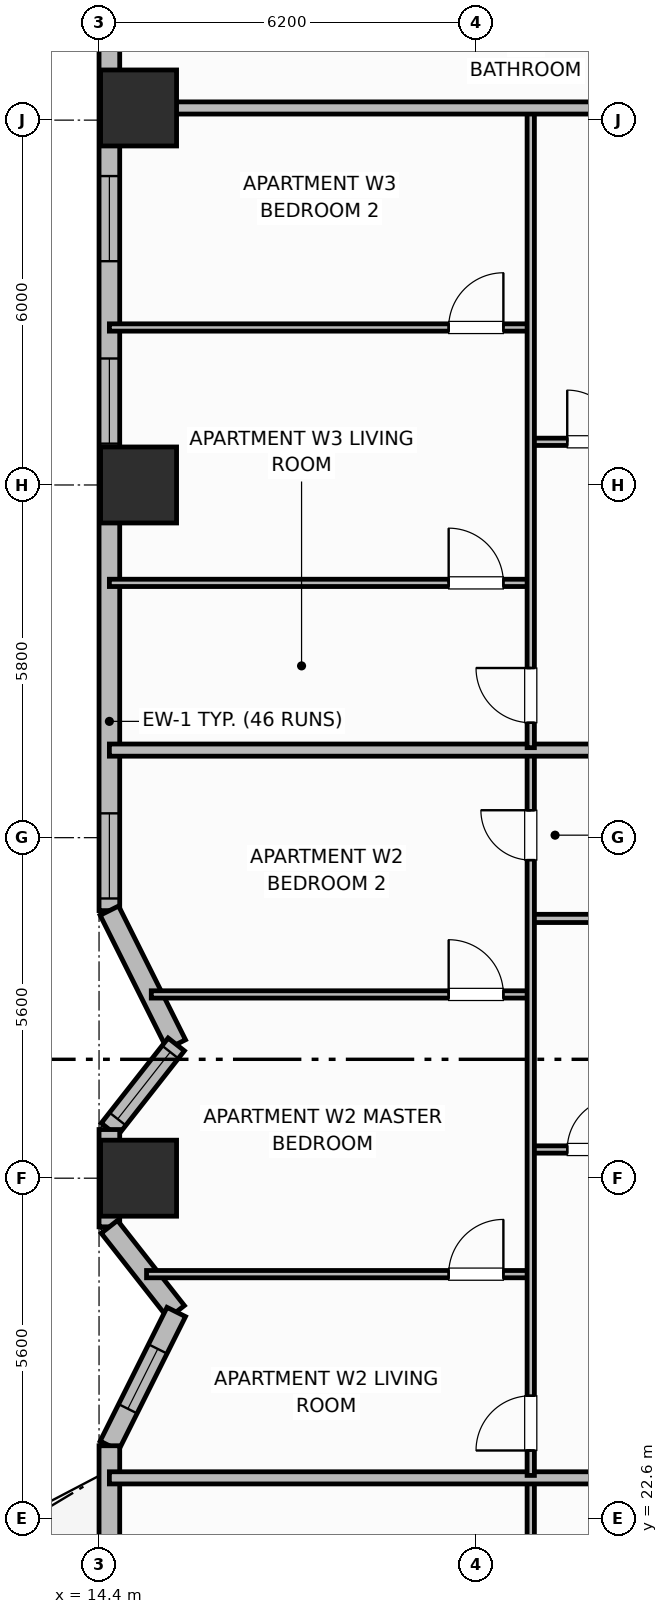
"""IFC4 building model, lengths in metres.
Left out: names, types, materials, properties, quantities, classifications, styles, units other than length and angle.
Written with IfcOpenShell. Run it as: python <this file> out.ifc"""

import sys

from ifc_helpers import new_model, si_unit, direction, frame, frame_2d, origin, origin_2d, place, context, subcontext, project, spatial, rectangle, extrude, element, fill, save


model = new_model("IFC4")
c1 = context("Model", 3, precision=1e-05, world=origin(), true_north=direction((0.0, 1.0)))
c2 = subcontext(c1, "Body", "Model", "MODEL_VIEW")
j1 = project(units=[si_unit("LENGTHUNIT", "METRE"), si_unit("PLANEANGLEUNIT", "RADIAN")], contexts=[c1])
p1 = place(None, origin())
s1 = spatial("IfcSite", under=j1, at=p1, CompositionType="ELEMENT")
p2 = place(p1, origin())
s2 = spatial("IfcBuilding", under=s1, at=p2, CompositionType="ELEMENT")
p3 = place(p2, frame((0.0, 0.0, 69.5)))
s3 = spatial("IfcBuildingStorey", under=s2, at=p3, CompositionType="ELEMENT", Elevation=69.5)
for number, where, z_axis, x_axis in (
    (1, (15.05, 28.2, 0.0), (0.0, 0.0, 1.0), (1.0, 0.0, 0.0)),
    (2, (15.05, 39.6, 0.0), (0.0, 0.0, 1.0), (1.0, 0.0, 0.0)),
    (3, (15.05, 45.8, 0.0), (0.0, 0.0, 1.0), (1.0, 0.0, 0.0)),
):
    element("IfcColumn", number, at=place(p3, frame(where, z_axis=z_axis, x_axis=x_axis)), inside=s3, PredefinedType="COLUMN", context=c2, shape_type="SweptSolid", body=[
        extrude(rectangle(XDim=1.25, YDim=1.25, at=origin_2d()), origin(), (0.0, 0.0, 1.0), 3.7),
    ])
p4 = place(p3, frame((14.57, 47.4, 0.0), z_axis=(0.0, 0.0, 1.0), x_axis=(0.0, -1.0, 0.0)))
e4 = element("IfcWall", 4, at=p4, inside=s3, PredefinedType="SOLIDWALL", context=c2, shape_type="SweptSolid", body=[
    extrude(rectangle(XDim=14.8, YDim=0.34, at=frame_2d((7.4, 0.0))), origin(), (0.0, 0.0, 1.0), 2.7),
])
p5 = place(p4, frame((2.72, 0.0, 0.69)))
e5 = element("IfcOpeningElement", 5, at=p5, cuts=e4, PredefinedType="OPENING", context=c2, shape_type="SweptSolid", body=[
    extrude(rectangle(XDim=1.4, YDim=1.85, at=frame_2d((0.7, 0.925))), frame((0.0, 0.18, 0.0), z_axis=(0.0, -1.0, 0.0), x_axis=(1.0, 0.0, 0.0)), (0.0, 0.0, 1.0), 0.36),
])
p6 = place(p4, frame((5.72, 0.0, 0.69)))
e6 = element("IfcOpeningElement", 6, at=p6, cuts=e4, PredefinedType="OPENING", context=c2, shape_type="SweptSolid", body=[
    extrude(rectangle(XDim=1.4, YDim=1.85, at=frame_2d((0.7, 0.925))), frame((0.0, 0.18, 0.0), z_axis=(0.0, -1.0, 0.0), x_axis=(1.0, 0.0, 0.0)), (0.0, 0.0, 1.0), 0.36),
])
p7 = place(p4, frame((13.2, 0.0, 0.69)))
e7 = element("IfcOpeningElement", 7, at=p7, cuts=e4, PredefinedType="OPENING", context=c2, shape_type="SweptSolid", body=[
    extrude(rectangle(XDim=1.4, YDim=1.85, at=frame_2d((0.7, 0.925))), frame((0.0, 0.18, 0.0), z_axis=(0.0, -1.0, 0.0), x_axis=(1.0, 0.0, 0.0)), (0.0, 0.0, 1.0), 0.36),
])
p8 = place(p3, frame((14.57, 32.6, 0.0), z_axis=(0.0, 0.0, 1.0), x_axis=(0.44713419144, -0.894466888625, 0.0)))
e8 = element("IfcWall", 8, at=p8, inside=s3, PredefinedType="SOLIDWALL", context=c2, shape_type="SweptSolid", body=[
    extrude(rectangle(XDim=2.46, YDim=0.34, at=frame_2d((1.23, 0.0))), origin(), (0.0, 0.0, 1.0), 2.7),
])
p9 = place(p3, frame((15.67, 30.4, 0.0), z_axis=(0.0, 0.0, 1.0), x_axis=(-0.617797325735, -0.786337373088, 0.0)))
e9 = element("IfcWall", 9, at=p9, inside=s3, PredefinedType="SOLIDWALL", context=c2, shape_type="SweptSolid", body=[
    extrude(rectangle(XDim=1.78, YDim=0.34, at=frame_2d((0.89, 0.0))), origin(), (0.0, 0.0, 1.0), 2.7),
])
p10 = place(p9, frame((0.16, 0.0, 0.69)))
e10 = element("IfcOpeningElement", 10, at=p10, cuts=e9, PredefinedType="OPENING", context=c2, shape_type="SweptSolid", body=[
    extrude(rectangle(XDim=1.4, YDim=1.85, at=frame_2d((0.7, 0.925))), frame((0.0, 0.18, 0.0), z_axis=(0.0, -1.0, 0.0), x_axis=(1.0, 0.0, 0.0)), (0.0, 0.0, 1.0), 0.36),
])
p11 = place(p3, frame((14.57, 29.0, 0.0), z_axis=(0.0, 0.0, 1.0), x_axis=(0.0, -1.0, 0.0)))
e11 = element("IfcWall", 11, at=p11, inside=s3, PredefinedType="SOLIDWALL", context=c2, shape_type="SweptSolid", body=[
    extrude(rectangle(XDim=1.6, YDim=0.34, at=frame_2d((0.8, 0.0))), origin(), (0.0, 0.0, 1.0), 2.7),
])
p12 = place(p3, frame((14.57, 27.4, 0.0), z_axis=(0.0, 0.0, 1.0), x_axis=(0.617797325735, -0.786337373088, 0.0)))
e12 = element("IfcWall", 12, at=p12, inside=s3, PredefinedType="SOLIDWALL", context=c2, shape_type="SweptSolid", body=[
    extrude(rectangle(XDim=1.78, YDim=0.34, at=frame_2d((0.89, 0.0))), origin(), (0.0, 0.0, 1.0), 2.7),
])
p13 = place(p3, frame((15.67, 26.0, 0.0), z_axis=(0.0, 0.0, 1.0), x_axis=(-0.447173890385, -0.894447042456, 0.0)))
e13 = element("IfcWall", 13, at=p13, inside=s3, PredefinedType="SOLIDWALL", context=c2, shape_type="SweptSolid", body=[
    extrude(rectangle(XDim=2.459, YDim=0.34, at=frame_2d((1.23, 0.0))), origin(), (0.0, 0.0, 1.0), 2.7),
])
p14 = place(p13, frame((0.68, 0.0, 0.89)))
e14 = element("IfcOpeningElement", 14, at=p14, cuts=e13, PredefinedType="OPENING", context=c2, shape_type="SweptSolid", body=[
    extrude(rectangle(XDim=1.1, YDim=1.65, at=frame_2d((0.55, 0.825))), frame((0.0, 0.18, 0.0), z_axis=(0.0, -1.0, 0.0), x_axis=(1.0, 0.0, 0.0)), (0.0, 0.0, 1.0), 0.36),
])
p15 = place(p3, frame((14.57, 23.8, 0.0), z_axis=(0.0, 0.0, 1.0), x_axis=(0.0, -1.0, 0.0)))
e15 = element("IfcWall", 15, at=p15, inside=s3, PredefinedType="SOLIDWALL", context=c2, shape_type="SweptSolid", body=[
    extrude(rectangle(XDim=14.8, YDim=0.34, at=frame_2d((7.4, 0.0))), origin(), (0.0, 0.0, 1.0), 2.7),
])
p16 = place(p15, frame((2.1, 0.0, 0.0)))
e16 = element("IfcOpeningElement", 16, at=p16, cuts=e15, PredefinedType="OPENING", context=c2, shape_type="SweptSolid", body=[
    extrude(rectangle(XDim=1.6, YDim=2.1, at=frame_2d((0.8, 1.05))), frame((0.0, 0.18, 0.0), z_axis=(0.0, -1.0, 0.0), x_axis=(1.0, 0.0, 0.0)), (0.0, 0.0, 1.0), 0.36),
])
p17 = place(p15, frame((5.2, 0.0, 0.89)))
e17 = element("IfcOpeningElement", 17, at=p17, cuts=e15, PredefinedType="OPENING", context=c2, shape_type="SweptSolid", body=[
    extrude(rectangle(XDim=1.1, YDim=1.65, at=frame_2d((0.55, 0.825))), frame((0.0, 0.18, 0.0), z_axis=(0.0, -1.0, 0.0), x_axis=(1.0, 0.0, 0.0)), (0.0, 0.0, 1.0), 0.36),
])
p18 = place(p15, frame((9.438, 0.0, 0.73)))
e18 = element("IfcOpeningElement", 18, at=p18, cuts=e15, PredefinedType="OPENING", context=c2, shape_type="SweptSolid", body=[
    extrude(rectangle(XDim=1.4, YDim=1.85, at=frame_2d((0.7, 0.925))), frame((0.0, 0.18, 0.0), z_axis=(0.0, -1.0, 0.0), x_axis=(1.0, 0.0, 0.0)), (0.0, 0.0, 1.0), 0.36),
])
p19 = place(p3, frame((21.5, 10.64, 0.0), z_axis=(0.0, 0.0, 1.0), x_axis=(0.0, 1.0, 0.0)))
e19 = element("IfcWall", 19, at=p19, inside=s3, PredefinedType="PARTITIONING", context=c2, shape_type="SweptSolid", body=[
    extrude(rectangle(XDim=12.592, YDim=0.12, at=frame_2d((6.296, 0.0))), origin(), (0.0, 0.0, 1.0), 2.53),
])
p20 = place(p19, frame((0.41, 0.0, 0.0)))
e20 = element("IfcOpeningElement", 20, at=p20, cuts=e19, PredefinedType="OPENING", context=c2, shape_type="SweptSolid", body=[
    extrude(rectangle(XDim=0.9, YDim=2.1, at=frame_2d((0.45, 1.05))), frame((0.0, 0.07, 0.0), z_axis=(0.0, -1.0, 0.0), x_axis=(1.0, 0.0, 0.0)), (0.0, 0.0, 1.0), 0.14),
])
p21 = place(p19, frame((10.471, 0.0, 0.0)))
e21 = element("IfcOpeningElement", 21, at=p21, cuts=e19, PredefinedType="OPENING", context=c2, shape_type="SweptSolid", body=[
    extrude(rectangle(XDim=0.82, YDim=2.08, at=frame_2d((0.41, 1.04))), frame((0.0, 0.07, 0.0), z_axis=(0.0, -1.0, 0.0), x_axis=(1.0, 0.0, 0.0)), (0.0, 0.0, 1.0), 0.14),
])
p22 = place(p3, frame((14.57, 23.272, 0.0), z_axis=(0.0, 0.0, 1.0), x_axis=(1.0, 0.0, 0.0)))
e22 = element("IfcWall", 22, at=p22, inside=s3, PredefinedType="PARTITIONING", context=c2, shape_type="SweptSolid", body=[
    extrude(rectangle(XDim=9.18, YDim=0.2, at=frame_2d((4.59, 0.0))), origin(), (0.0, 0.0, 1.0), 2.53),
])
p23 = place(p3, frame((21.5, 28.672, 0.0), z_axis=(0.0, 0.0, 1.0), x_axis=(1.0, 0.0, 0.0)))
e23 = element("IfcWall", 23, at=p23, inside=s3, PredefinedType="PARTITIONING", context=c2, shape_type="SweptSolid", body=[
    extrude(rectangle(XDim=2.25, YDim=0.12, at=frame_2d((1.125, 0.0))), origin(), (0.0, 0.0, 1.0), 2.53),
])
p24 = place(p23, frame((0.6, 0.0, 0.0)))
e24 = element("IfcOpeningElement", 24, at=p24, cuts=e23, PredefinedType="OPENING", context=c2, shape_type="SweptSolid", body=[
    extrude(rectangle(XDim=0.85, YDim=2.1, at=frame_2d((0.425, 1.05))), frame((0.0, 0.07, 0.0), z_axis=(0.0, -1.0, 0.0), x_axis=(1.0, 0.0, 0.0)), (0.0, 0.0, 1.0), 0.14),
])
p25 = place(p3, frame((21.5, 32.472, 0.0), z_axis=(0.0, 0.0, 1.0), x_axis=(1.0, 0.0, 0.0)))
e25 = element("IfcWall", 25, at=p25, inside=s3, PredefinedType="PARTITIONING", context=c2, shape_type="SweptSolid", body=[
    extrude(rectangle(XDim=2.25, YDim=0.135, at=frame_2d((1.125, 0.0))), origin(), (0.0, 0.0, 1.0), 2.53),
])
p26 = place(p3, frame((15.181, 26.622, 0.0), z_axis=(0.0, 0.0, 1.0), x_axis=(1.0, 0.0, 0.0)))
e26 = element("IfcWall", 26, at=p26, inside=s3, PredefinedType="PARTITIONING", context=c2, shape_type="SweptSolid", body=[
    extrude(rectangle(XDim=6.319, YDim=0.12, at=frame_2d((3.159, 0.0))), origin(), (0.0, 0.0, 1.0), 2.53),
])
p27 = place(p26, frame((4.969, 0.0, 0.0)))
e27 = element("IfcOpeningElement", 27, at=p27, cuts=e26, PredefinedType="OPENING", context=c2, shape_type="SweptSolid", body=[
    extrude(rectangle(XDim=0.9, YDim=2.1, at=frame_2d((0.45, 1.05))), frame((0.0, 0.07, 0.0), z_axis=(0.0, -1.0, 0.0), x_axis=(1.0, 0.0, 0.0)), (0.0, 0.0, 1.0), 0.14),
])
p28 = place(p3, frame((15.259, 31.222, 0.0), z_axis=(0.0, 0.0, 1.0), x_axis=(1.0, 0.0, 0.0)))
e28 = element("IfcWall", 28, at=p28, inside=s3, PredefinedType="PARTITIONING", context=c2, shape_type="SweptSolid", body=[
    extrude(rectangle(XDim=6.241, YDim=0.12, at=frame_2d((3.121, 0.0))), origin(), (0.0, 0.0, 1.0), 2.53),
])
p29 = place(p28, frame((4.891, 0.0, 0.0)))
e29 = element("IfcOpeningElement", 29, at=p29, cuts=e28, PredefinedType="OPENING", context=c2, shape_type="SweptSolid", body=[
    extrude(rectangle(XDim=0.9, YDim=2.1, at=frame_2d((0.45, 1.05))), frame((0.0, 0.07, 0.0), z_axis=(0.0, -1.0, 0.0), x_axis=(1.0, 0.0, 0.0)), (0.0, 0.0, 1.0), 0.14),
])
p30 = place(p3, frame((21.5, 23.312, 0.0), z_axis=(0.0, 0.0, 1.0), x_axis=(0.0, 1.0, 0.0)))
e30 = element("IfcWall", 30, at=p30, inside=s3, PredefinedType="PARTITIONING", context=c2, shape_type="SweptSolid", body=[
    extrude(rectangle(XDim=11.888, YDim=0.12, at=frame_2d((5.944, 0.0))), origin(), (0.0, 0.0, 1.0), 2.53),
])
p31 = place(p30, frame((0.41, 0.0, 0.0)))
e31 = element("IfcOpeningElement", 31, at=p31, cuts=e30, PredefinedType="OPENING", context=c2, shape_type="SweptSolid", body=[
    extrude(rectangle(XDim=0.9, YDim=2.1, at=frame_2d((0.45, 1.05))), frame((0.0, 0.07, 0.0), z_axis=(0.0, -1.0, 0.0), x_axis=(1.0, 0.0, 0.0)), (0.0, 0.0, 1.0), 0.14),
])
p32 = place(p30, frame((10.119, 0.0, 0.0)))
e32 = element("IfcOpeningElement", 32, at=p32, cuts=e30, PredefinedType="OPENING", context=c2, shape_type="SweptSolid", body=[
    extrude(rectangle(XDim=0.82, YDim=2.08, at=frame_2d((0.41, 1.04))), frame((0.0, 0.07, 0.0), z_axis=(0.0, -1.0, 0.0), x_axis=(1.0, 0.0, 0.0)), (0.0, 0.0, 1.0), 0.14),
])
p33 = place(p3, frame((14.57, 35.24, 0.0), z_axis=(0.0, 0.0, 1.0), x_axis=(1.0, 0.0, 0.0)))
e33 = element("IfcWall", 33, at=p33, inside=s3, PredefinedType="PARTITIONING", context=c2, shape_type="SweptSolid", body=[
    extrude(rectangle(XDim=9.18, YDim=0.2, at=frame_2d((4.59, 0.0))), origin(), (0.0, 0.0, 1.0), 2.53),
])
p34 = place(p3, frame((21.5, 40.31, 0.0), z_axis=(0.0, 0.0, 1.0), x_axis=(1.0, 0.0, 0.0)))
e34 = element("IfcWall", 34, at=p34, inside=s3, PredefinedType="PARTITIONING", context=c2, shape_type="SweptSolid", body=[
    extrude(rectangle(XDim=2.25, YDim=0.12, at=frame_2d((1.125, 0.0))), origin(), (0.0, 0.0, 1.0), 2.53),
])
p35 = place(p34, frame((0.6, 0.0, 0.0)))
e35 = element("IfcOpeningElement", 35, at=p35, cuts=e34, PredefinedType="OPENING", context=c2, shape_type="SweptSolid", body=[
    extrude(rectangle(XDim=0.85, YDim=2.1, at=frame_2d((0.425, 1.05))), frame((0.0, 0.07, 0.0), z_axis=(0.0, -1.0, 0.0), x_axis=(1.0, 0.0, 0.0)), (0.0, 0.0, 1.0), 0.14),
])
p36 = place(p3, frame((14.57, 37.99, 0.0), z_axis=(0.0, 0.0, 1.0), x_axis=(1.0, 0.0, 0.0)))
e36 = element("IfcWall", 36, at=p36, inside=s3, PredefinedType="PARTITIONING", context=c2, shape_type="SweptSolid", body=[
    extrude(rectangle(XDim=6.93, YDim=0.12, at=frame_2d((3.465, 0.0))), origin(), (0.0, 0.0, 1.0), 2.53),
])
p37 = place(p36, frame((5.58, 0.0, 0.0)))
e37 = element("IfcOpeningElement", 37, at=p37, cuts=e36, PredefinedType="OPENING", context=c2, shape_type="SweptSolid", body=[
    extrude(rectangle(XDim=0.9, YDim=2.1, at=frame_2d((0.45, 1.05))), frame((0.0, 0.07, 0.0), z_axis=(0.0, -1.0, 0.0), x_axis=(1.0, 0.0, 0.0)), (0.0, 0.0, 1.0), 0.14),
])
p38 = place(p3, frame((14.57, 42.19, 0.0), z_axis=(0.0, 0.0, 1.0), x_axis=(1.0, 0.0, 0.0)))
e38 = element("IfcWall", 38, at=p38, inside=s3, PredefinedType="PARTITIONING", context=c2, shape_type="SweptSolid", body=[
    extrude(rectangle(XDim=6.93, YDim=0.12, at=frame_2d((3.465, 0.0))), origin(), (0.0, 0.0, 1.0), 2.53),
])
p39 = place(p38, frame((5.58, 0.0, 0.0)))
e39 = element("IfcOpeningElement", 39, at=p39, cuts=e38, PredefinedType="OPENING", context=c2, shape_type="SweptSolid", body=[
    extrude(rectangle(XDim=0.9, YDim=2.1, at=frame_2d((0.45, 1.05))), frame((0.0, 0.07, 0.0), z_axis=(0.0, -1.0, 0.0), x_axis=(1.0, 0.0, 0.0)), (0.0, 0.0, 1.0), 0.14),
])
p40 = place(p3, frame((21.5, 35.28, 0.0), z_axis=(0.0, 0.0, 1.0), x_axis=(0.0, 1.0, 0.0)))
e40 = element("IfcWall", 40, at=p40, inside=s3, PredefinedType="PARTITIONING", context=c2, shape_type="SweptSolid", body=[
    extrude(rectangle(XDim=10.48, YDim=0.12, at=frame_2d((5.24, 0.0))), origin(), (0.0, 0.0, 1.0), 2.53),
])
p41 = place(p40, frame((0.41, 0.0, 0.0)))
e41 = element("IfcOpeningElement", 41, at=p41, cuts=e40, PredefinedType="OPENING", context=c2, shape_type="SweptSolid", body=[
    extrude(rectangle(XDim=0.9, YDim=2.1, at=frame_2d((0.45, 1.05))), frame((0.0, 0.07, 0.0), z_axis=(0.0, -1.0, 0.0), x_axis=(1.0, 0.0, 0.0)), (0.0, 0.0, 1.0), 0.14),
])
p42 = place(p3, frame((14.99, 45.8, 0.0), z_axis=(0.0, 0.0, 1.0), x_axis=(1.0, 0.0, 0.0)))
e42 = element("IfcWall", 42, at=p42, inside=s3, PredefinedType="PARTITIONING", context=c2, shape_type="SweptSolid", body=[
    extrude(rectangle(XDim=8.76, YDim=0.2, at=frame_2d((4.38, 0.0))), origin(), (0.0, 0.0, 1.0), 2.53),
])
p43 = place(p5, origin())
e43 = element("IfcWindow", 43, at=p43, inside=s3, PartitioningType="SINGLE_PANEL", PredefinedType="WINDOW", context=c2, shape_type="SweptSolid", body=[
    extrude(rectangle(XDim=1.4, YDim=1.85, at=frame_2d((0.7, 0.925))), frame((0.0, 0.03, 0.0), z_axis=(0.0, -1.0, 0.0), x_axis=(1.0, 0.0, 0.0)), (0.0, 0.0, 1.0), 0.06),
])
fill(e5, e43)
p44 = place(p6, origin())
e44 = element("IfcWindow", 44, at=p44, inside=s3, PartitioningType="SINGLE_PANEL", PredefinedType="WINDOW", context=c2, shape_type="SweptSolid", body=[
    extrude(rectangle(XDim=1.4, YDim=1.85, at=frame_2d((0.7, 0.925))), frame((0.0, 0.03, 0.0), z_axis=(0.0, -1.0, 0.0), x_axis=(1.0, 0.0, 0.0)), (0.0, 0.0, 1.0), 0.06),
])
fill(e6, e44)
p45 = place(p7, origin())
e45 = element("IfcWindow", 45, at=p45, inside=s3, PartitioningType="SINGLE_PANEL", PredefinedType="WINDOW", context=c2, shape_type="SweptSolid", body=[
    extrude(rectangle(XDim=1.4, YDim=1.85, at=frame_2d((0.7, 0.925))), frame((0.0, 0.03, 0.0), z_axis=(0.0, -1.0, 0.0), x_axis=(1.0, 0.0, 0.0)), (0.0, 0.0, 1.0), 0.06),
])
fill(e7, e45)
p46 = place(p10, origin())
e46 = element("IfcWindow", 46, at=p46, inside=s3, PartitioningType="SINGLE_PANEL", PredefinedType="WINDOW", context=c2, shape_type="SweptSolid", body=[
    extrude(rectangle(XDim=1.4, YDim=1.85, at=frame_2d((0.7, 0.925))), frame((0.0, 0.03, 0.0), z_axis=(0.0, -1.0, 0.0), x_axis=(1.0, 0.0, 0.0)), (0.0, 0.0, 1.0), 0.06),
])
fill(e10, e46)
p47 = place(p14, origin())
e47 = element("IfcWindow", 47, at=p47, inside=s3, PartitioningType="SINGLE_PANEL", PredefinedType="WINDOW", context=c2, shape_type="SweptSolid", body=[
    extrude(rectangle(XDim=1.1, YDim=1.65, at=frame_2d((0.55, 0.825))), frame((0.0, 0.03, 0.0), z_axis=(0.0, -1.0, 0.0), x_axis=(1.0, 0.0, 0.0)), (0.0, 0.0, 1.0), 0.06),
])
fill(e14, e47)
p48 = place(p24, origin())
e48 = element("IfcDoor", 48, at=p48, inside=s3, OperationType="SINGLE_SWING_RIGHT", PredefinedType="DOOR", context=c2, shape_type="SweptSolid", body=[
    extrude(rectangle(XDim=0.85, YDim=2.1, at=frame_2d((0.425, 1.05))), frame((0.0, 0.025, 0.0), z_axis=(0.0, -1.0, 0.0), x_axis=(1.0, 0.0, 0.0)), (0.0, 0.0, 1.0), 0.05),
])
fill(e24, e48)
p49 = place(p27, origin())
e49 = element("IfcDoor", 49, at=p49, inside=s3, OperationType="SINGLE_SWING_RIGHT", PredefinedType="DOOR", context=c2, shape_type="SweptSolid", body=[
    extrude(rectangle(XDim=0.9, YDim=2.1, at=frame_2d((0.45, 1.05))), frame((0.0, 0.025, 0.0), z_axis=(0.0, -1.0, 0.0), x_axis=(1.0, 0.0, 0.0)), (0.0, 0.0, 1.0), 0.05),
])
fill(e27, e49)
p50 = place(p29, origin())
e50 = element("IfcDoor", 50, at=p50, inside=s3, OperationType="SINGLE_SWING_LEFT", PredefinedType="DOOR", context=c2, shape_type="SweptSolid", body=[
    extrude(rectangle(XDim=0.9, YDim=2.1, at=frame_2d((0.45, 1.05))), frame((0.0, 0.025, 0.0), z_axis=(0.0, -1.0, 0.0), x_axis=(1.0, 0.0, 0.0)), (0.0, 0.0, 1.0), 0.05),
])
fill(e29, e50)
p51 = place(p31, origin())
e51 = element("IfcDoor", 51, at=p51, inside=s3, OperationType="SINGLE_SWING_LEFT", PredefinedType="DOOR", context=c2, shape_type="SweptSolid", body=[
    extrude(rectangle(XDim=0.9, YDim=2.1, at=frame_2d((0.45, 1.05))), frame((0.0, 0.025, 0.0), z_axis=(0.0, -1.0, 0.0), x_axis=(1.0, 0.0, 0.0)), (0.0, 0.0, 1.0), 0.05),
])
fill(e31, e51)
p52 = place(p32, origin())
e52 = element("IfcDoor", 52, at=p52, inside=s3, OperationType="SINGLE_SWING_RIGHT", PredefinedType="DOOR", context=c2, shape_type="SweptSolid", body=[
    extrude(rectangle(XDim=0.82, YDim=2.08, at=frame_2d((0.41, 1.04))), frame((0.0, 0.025, 0.0), z_axis=(0.0, -1.0, 0.0), x_axis=(1.0, 0.0, 0.0)), (0.0, 0.0, 1.0), 0.05),
])
fill(e32, e52)
p53 = place(p35, origin())
e53 = element("IfcDoor", 53, at=p53, inside=s3, OperationType="SINGLE_SWING_LEFT", PredefinedType="DOOR", context=c2, shape_type="SweptSolid", body=[
    extrude(rectangle(XDim=0.85, YDim=2.1, at=frame_2d((0.425, 1.05))), frame((0.0, 0.025, 0.0), z_axis=(0.0, -1.0, 0.0), x_axis=(1.0, 0.0, 0.0)), (0.0, 0.0, 1.0), 0.05),
])
fill(e35, e53)
p54 = place(p37, origin())
e54 = element("IfcDoor", 54, at=p54, inside=s3, OperationType="SINGLE_SWING_LEFT", PredefinedType="DOOR", context=c2, shape_type="SweptSolid", body=[
    extrude(rectangle(XDim=0.9, YDim=2.1, at=frame_2d((0.45, 1.05))), frame((0.0, 0.025, 0.0), z_axis=(0.0, -1.0, 0.0), x_axis=(1.0, 0.0, 0.0)), (0.0, 0.0, 1.0), 0.05),
])
fill(e37, e54)
p55 = place(p39, origin())
e55 = element("IfcDoor", 55, at=p55, inside=s3, OperationType="SINGLE_SWING_RIGHT", PredefinedType="DOOR", context=c2, shape_type="SweptSolid", body=[
    extrude(rectangle(XDim=0.9, YDim=2.1, at=frame_2d((0.45, 1.05))), frame((0.0, 0.025, 0.0), z_axis=(0.0, -1.0, 0.0), x_axis=(1.0, 0.0, 0.0)), (0.0, 0.0, 1.0), 0.05),
])
fill(e39, e55)
p56 = place(p41, origin())
e56 = element("IfcDoor", 56, at=p56, inside=s3, OperationType="SINGLE_SWING_RIGHT", PredefinedType="DOOR", context=c2, shape_type="SweptSolid", body=[
    extrude(rectangle(XDim=0.9, YDim=2.1, at=frame_2d((0.45, 1.05))), frame((0.0, 0.025, 0.0), z_axis=(0.0, -1.0, 0.0), x_axis=(1.0, 0.0, 0.0)), (0.0, 0.0, 1.0), 0.05),
])
fill(e41, e56)
save(model, sys.argv[1])
